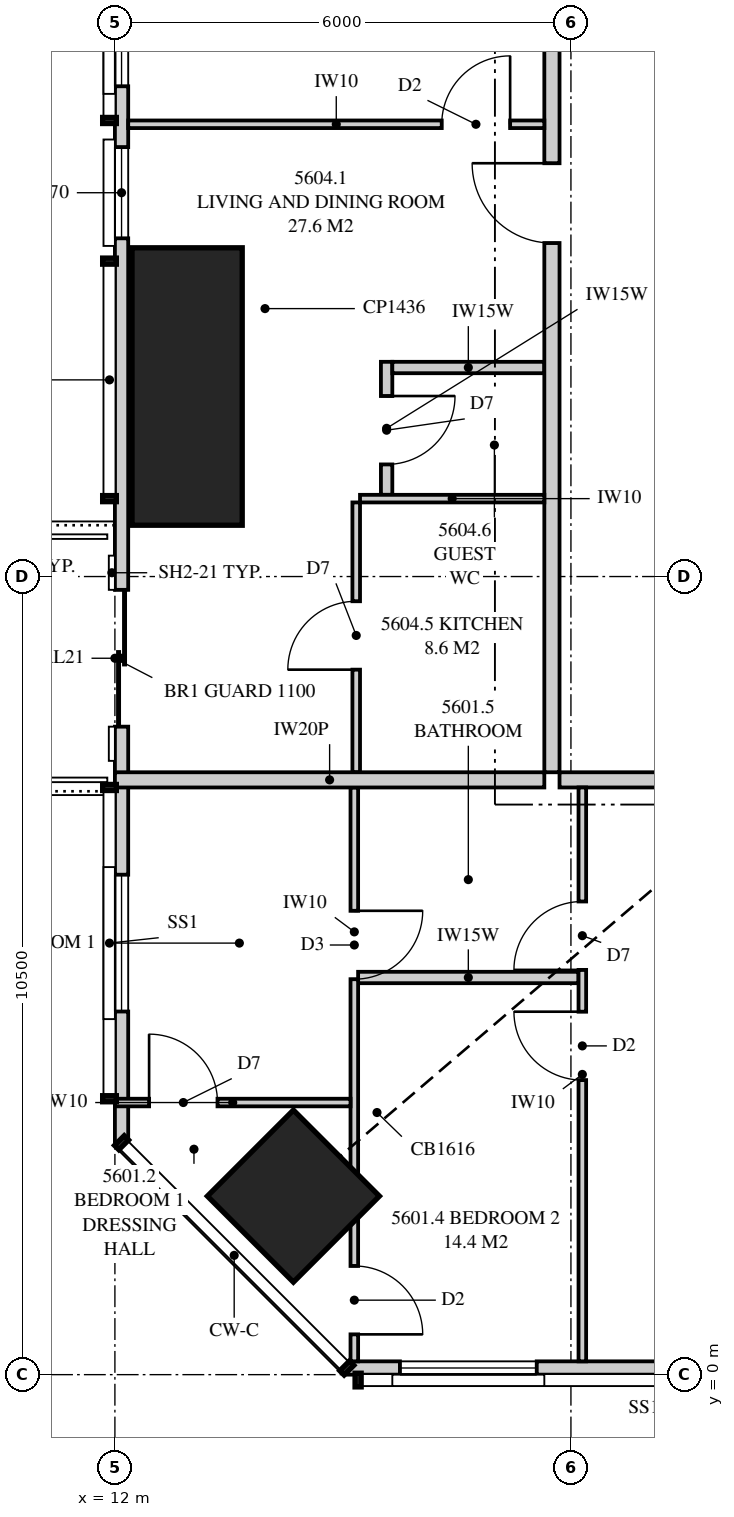
"""IFC4 building model, lengths in metres.
Left out: names, types, materials, properties, quantities, classifications, styles, units other than length and angle.
Written with IfcOpenShell. Run it as: python <this file> out.ifc"""

import sys

from ifc_helpers import new_model, si_unit, direction, frame, frame_2d, origin, origin_2d, place, context, subcontext, project, spatial, polyline, rectangle, hollow_rectangle, outline, extrude, element, fill, save


model = new_model("IFC4")
c1 = context("Model", 3, precision=1e-05, world=origin(), true_north=direction((0.0, 1.0)))
c2 = subcontext(c1, "Body", "Model", "MODEL_VIEW")
j1 = project(units=[si_unit("LENGTHUNIT", "METRE"), si_unit("PLANEANGLEUNIT", "RADIAN")], contexts=[c1])
p1 = place(None, origin())
s1 = spatial("IfcSite", under=j1, at=p1, CompositionType="ELEMENT")
p2 = place(p1, origin())
s2 = spatial("IfcBuilding", under=s1, at=p2, CompositionType="ELEMENT")
p3 = place(p2, frame((0.0, 0.0, 204.6)))
s3 = spatial("IfcBuildingStorey", under=s2, at=p3, CompositionType="ELEMENT", Elevation=204.6)
p4 = place(p3, frame((14.348, 2.348, 0.0), z_axis=(0.0, 0.0, 1.0), x_axis=(0.707106781187, 0.707106781187, 0.0)))
e1 = element("IfcColumn", 1, at=p4, inside=s3, PredefinedType="COLUMN", context=c2, shape_type="SweptSolid", body=[
    extrude(hollow_rectangle(XDim=1.6, YDim=1.6, WallThickness=0.125, at=origin_2d()), origin(), (0.0, 0.0, 1.0), 3.35),
])
p5 = place(p3, frame((12.95, 13.0, 0.0), z_axis=(0.0, 0.0, 1.0), x_axis=(1.0, 0.0, 0.0)))
e2 = element("IfcColumn", 2, at=p5, inside=s3, PredefinedType="COLUMN", context=c2, shape_type="SweptSolid", body=[
    extrude(rectangle(XDim=1.45, YDim=3.65, at=origin_2d()), origin(), (0.0, 0.0, 1.0), 3.35),
])
p6 = place(p3, frame((15.051, 0.087, 0.0), z_axis=(0.0, 0.0, 1.0), x_axis=(1.0, 0.0, 0.0)))
e3 = element("IfcWall", 3, at=p6, inside=s3, PredefinedType="SOLIDWALL", context=c2, shape_type="SweptSolid", body=[
    extrude(rectangle(XDim=34.897, YDim=0.175, at=frame_2d((17.449, 0.0))), origin(), (0.0, 0.0, 1.0), 3.07),
])
p7 = place(p6, frame((0.699, 0.0, 0.4)))
e4 = element("IfcOpeningElement", 4, at=p7, cuts=e3, PredefinedType="OPENING", context=c2, shape_type="SweptSolid", body=[
    extrude(rectangle(XDim=1.8, YDim=1.7, at=frame_2d((0.9, 0.85))), frame((0.0, 0.097, 0.0), z_axis=(0.0, -1.0, 0.0), x_axis=(1.0, 0.0, 0.0)), (0.0, 0.0, 1.0), 0.195),
])
p8 = place(p6, frame((9.274, 0.0, 0.4)))
e5 = element("IfcOpeningElement", 5, at=p8, cuts=e3, PredefinedType="OPENING", context=c2, shape_type="SweptSolid", body=[
    extrude(rectangle(XDim=2.4, YDim=1.7, at=frame_2d((1.2, 0.85))), frame((0.0, 0.097, 0.0), z_axis=(0.0, -1.0, 0.0), x_axis=(1.0, 0.0, 0.0)), (0.0, 0.0, 1.0), 0.195),
])
p9 = place(p6, frame((13.561, 0.0, 0.0)))
e6 = element("IfcOpeningElement", 6, at=p9, cuts=e3, PredefinedType="OPENING", context=c2, shape_type="SweptSolid", body=[
    extrude(rectangle(XDim=1.8, YDim=2.1, at=frame_2d((0.9, 1.05))), frame((0.0, 0.097, 0.0), z_axis=(0.0, -1.0, 0.0), x_axis=(1.0, 0.0, 0.0)), (0.0, 0.0, 1.0), 0.195),
])
p10 = place(p6, frame((20.049, 0.0, 0.4)))
e7 = element("IfcOpeningElement", 7, at=p10, cuts=e3, PredefinedType="OPENING", context=c2, shape_type="SweptSolid", body=[
    extrude(rectangle(XDim=1.8, YDim=1.7, at=frame_2d((0.9, 0.85))), frame((0.0, 0.097, 0.0), z_axis=(0.0, -1.0, 0.0), x_axis=(1.0, 0.0, 0.0)), (0.0, 0.0, 1.0), 0.195),
])
p11 = place(p6, frame((23.649, 0.0, 0.4)))
e8 = element("IfcOpeningElement", 8, at=p11, cuts=e3, PredefinedType="OPENING", context=c2, shape_type="SweptSolid", body=[
    extrude(rectangle(XDim=1.8, YDim=1.7, at=frame_2d((0.9, 0.85))), frame((0.0, 0.097, 0.0), z_axis=(0.0, -1.0, 0.0), x_axis=(1.0, 0.0, 0.0)), (0.0, 0.0, 1.0), 0.195),
])
p12 = place(p6, frame((29.625, 0.0, 0.4)))
e9 = element("IfcOpeningElement", 9, at=p12, cuts=e3, PredefinedType="OPENING", context=c2, shape_type="SweptSolid", body=[
    extrude(rectangle(XDim=1.8, YDim=1.7, at=frame_2d((0.9, 0.85))), frame((0.0, 0.097, 0.0), z_axis=(0.0, -1.0, 0.0), x_axis=(1.0, 0.0, 0.0)), (0.0, 0.0, 1.0), 0.195),
])
p13 = place(p6, frame((32.51, 0.0, 0.4)))
e10 = element("IfcOpeningElement", 10, at=p13, cuts=e3, PredefinedType="OPENING", context=c2, shape_type="SweptSolid", body=[
    extrude(rectangle(XDim=1.8, YDim=1.7, at=frame_2d((0.9, 0.85))), frame((0.0, 0.097, 0.0), z_axis=(0.0, -1.0, 0.0), x_axis=(1.0, 0.0, 0.0)), (0.0, 0.0, 1.0), 0.195),
])
p14 = place(p3, frame((12.087, 32.949, 0.0), z_axis=(0.0, 0.0, 1.0), x_axis=(0.0, -1.0, 0.0)))
e11 = element("IfcWall", 11, at=p14, inside=s3, PredefinedType="SOLIDWALL", context=c2, shape_type="SweptSolid", body=[
    extrude(rectangle(XDim=29.897, YDim=0.175, at=frame_2d((14.949, 0.0))), origin(), (0.0, 0.0, 1.0), 3.07),
])
p15 = place(p14, frame((1.226, 0.0, 0.4)))
e12 = element("IfcOpeningElement", 12, at=p15, cuts=e11, PredefinedType="OPENING", context=c2, shape_type="SweptSolid", body=[
    extrude(rectangle(XDim=1.8, YDim=1.7, at=frame_2d((0.9, 0.85))), frame((0.0, 0.097, 0.0), z_axis=(0.0, -1.0, 0.0), x_axis=(1.0, 0.0, 0.0)), (0.0, 0.0, 1.0), 0.195),
])
p16 = place(p14, frame((4.224, 0.0, 0.4)))
e13 = element("IfcOpeningElement", 13, at=p16, cuts=e11, PredefinedType="OPENING", context=c2, shape_type="SweptSolid", body=[
    extrude(rectangle(XDim=1.8, YDim=1.7, at=frame_2d((0.9, 0.85))), frame((0.0, 0.097, 0.0), z_axis=(0.0, -1.0, 0.0), x_axis=(1.0, 0.0, 0.0)), (0.0, 0.0, 1.0), 0.195),
])
p17 = place(p14, frame((10.974, 0.0, 0.4)))
e14 = element("IfcOpeningElement", 14, at=p17, cuts=e11, PredefinedType="OPENING", context=c2, shape_type="SweptSolid", body=[
    extrude(rectangle(XDim=1.8, YDim=1.7, at=frame_2d((0.9, 0.85))), frame((0.0, 0.097, 0.0), z_axis=(0.0, -1.0, 0.0), x_axis=(1.0, 0.0, 0.0)), (0.0, 0.0, 1.0), 0.195),
])
p18 = place(p14, frame((14.199, 0.0, 0.4)))
e15 = element("IfcOpeningElement", 15, at=p18, cuts=e11, PredefinedType="OPENING", context=c2, shape_type="SweptSolid", body=[
    extrude(rectangle(XDim=1.8, YDim=1.7, at=frame_2d((0.9, 0.85))), frame((0.0, 0.097, 0.0), z_axis=(0.0, -1.0, 0.0), x_axis=(1.0, 0.0, 0.0)), (0.0, 0.0, 1.0), 0.195),
])
p19 = place(p14, frame((22.624, 0.0, 0.0)))
e16 = element("IfcOpeningElement", 16, at=p19, cuts=e11, PredefinedType="OPENING", context=c2, shape_type="SweptSolid", body=[
    extrude(rectangle(XDim=1.8, YDim=2.1, at=frame_2d((0.9, 1.05))), frame((0.0, 0.097, 0.0), z_axis=(0.0, -1.0, 0.0), x_axis=(1.0, 0.0, 0.0)), (0.0, 0.0, 1.0), 0.195),
])
p20 = place(p14, frame((16.799, 0.0, 0.4)))
e17 = element("IfcOpeningElement", 17, at=p20, cuts=e11, PredefinedType="OPENING", context=c2, shape_type="SweptSolid", body=[
    extrude(rectangle(XDim=1.2, YDim=1.7, at=frame_2d((0.6, 0.85))), frame((0.0, 0.097, 0.0), z_axis=(0.0, -1.0, 0.0), x_axis=(1.0, 0.0, 0.0)), (0.0, 0.0, 1.0), 0.195),
])
p21 = place(p14, frame((26.371, 0.0, 0.4)))
e18 = element("IfcOpeningElement", 18, at=p21, cuts=e11, PredefinedType="OPENING", context=c2, shape_type="SweptSolid", body=[
    extrude(rectangle(XDim=1.8, YDim=1.7, at=frame_2d((0.9, 0.85))), frame((0.0, 0.097, 0.0), z_axis=(0.0, -1.0, 0.0), x_axis=(1.0, 0.0, 0.0)), (0.0, 0.0, 1.0), 0.195),
])
p22 = place(p3, frame((17.85, 7.825, 0.0), z_axis=(0.0, 0.0, 1.0), x_axis=(1.0, 0.0, 0.0)))
e19 = element("IfcWall", 19, at=p22, inside=s3, PredefinedType="PARTITIONING", context=c2, shape_type="SweptSolid", body=[
    extrude(outline(polyline([(0.0, 0.0), (3.85, 0.0), (3.85, 2.47), (3.69, 2.47), (3.69, 3.07), (3.392, 3.07), (3.392, 2.491), (2.43, 2.491), (2.43, 3.07), (0.0, 3.07), (0.0, 0.0)])), frame((0.0, 0.1, 0.0), z_axis=(0.0, -1.0, 0.0), x_axis=(1.0, 0.0, 0.0)), (0.0, 0.0, 1.0), 0.2),
])
p23 = place(p3, frame((15.15, 0.175, 0.0), z_axis=(0.0, 0.0, 1.0), x_axis=(0.0, 1.0, 0.0)))
e20 = element("IfcWall", 20, at=p23, inside=s3, PredefinedType="PARTITIONING", context=c2, shape_type="SweptSolid", body=[
    extrude(outline(polyline([(0.0, 0.0), (7.55, 0.0), (7.55, 3.07), (3.211, 3.07), (3.211, 2.491), (2.548, 2.491), (2.548, 2.07), (1.515, 2.07), (1.515, 3.07), (0.0, 3.07), (0.0, 0.0)])), frame((0.0, 0.05, 0.0), z_axis=(0.0, -1.0, 0.0), x_axis=(1.0, 0.0, 0.0)), (0.0, 0.0, 1.0), 0.1),
])
p24 = place(p23, frame((0.355, 0.0, 0.0)))
e21 = element("IfcOpeningElement", 21, at=p24, cuts=e20, PredefinedType="OPENING", context=c2, shape_type="SweptSolid", body=[
    extrude(rectangle(XDim=0.9, YDim=2.1, at=frame_2d((0.45, 1.05))), frame((0.0, 0.06, 0.0), z_axis=(0.0, -1.0, 0.0), x_axis=(1.0, 0.0, 0.0)), (0.0, 0.0, 1.0), 0.12),
])
p25 = place(p23, frame((5.027, 0.0, 0.0)))
e22 = element("IfcOpeningElement", 22, at=p25, cuts=e20, PredefinedType="OPENING", context=c2, shape_type="SweptSolid", body=[
    extrude(rectangle(XDim=0.9, YDim=2.1, at=frame_2d((0.45, 1.05))), frame((0.0, 0.06, 0.0), z_axis=(0.0, -1.0, 0.0), x_axis=(1.0, 0.0, 0.0)), (0.0, 0.0, 1.0), 0.12),
])
p26 = place(p3, frame((18.15, 0.175, 0.0), z_axis=(0.0, 0.0, 1.0), x_axis=(0.0, 1.0, 0.0)))
e23 = element("IfcWall", 23, at=p26, inside=s3, PredefinedType="PARTITIONING", context=c2, shape_type="SweptSolid", body=[
    extrude(outline(polyline([(0.0, 0.0), (7.55, 0.0), (7.55, 3.07), (5.774, 3.07), (5.774, 2.491), (5.067, 2.491), (5.067, 3.07), (2.017, 3.07), (2.017, 2.07), (0.984, 2.07), (0.984, 3.07), (0.0, 3.07), (0.0, 0.0)])), frame((0.0, 0.05, 0.0), z_axis=(0.0, -1.0, 0.0), x_axis=(1.0, 0.0, 0.0)), (0.0, 0.0, 1.0), 0.1),
])
p27 = place(p26, frame((3.7, 0.0, 0.0)))
e24 = element("IfcOpeningElement", 24, at=p27, cuts=e23, PredefinedType="OPENING", context=c2, shape_type="SweptSolid", body=[
    extrude(rectangle(XDim=0.9, YDim=2.1, at=frame_2d((0.45, 1.05))), frame((0.0, 0.06, 0.0), z_axis=(0.0, -1.0, 0.0), x_axis=(1.0, 0.0, 0.0)), (0.0, 0.0, 1.0), 0.12),
])
p28 = place(p26, frame((5.15, 0.0, 0.0)))
e25 = element("IfcOpeningElement", 25, at=p28, cuts=e23, PredefinedType="OPENING", context=c2, shape_type="SweptSolid", body=[
    extrude(rectangle(XDim=0.9, YDim=2.1, at=frame_2d((0.45, 1.05))), frame((0.0, 0.06, 0.0), z_axis=(0.0, -1.0, 0.0), x_axis=(1.0, 0.0, 0.0)), (0.0, 0.0, 1.0), 0.12),
])
p29 = place(p3, frame((12.0, 3.58, 0.0), z_axis=(0.0, 0.0, 1.0), x_axis=(1.0, 0.0, 0.0)))
e26 = element("IfcWall", 26, at=p29, inside=s3, PredefinedType="PARTITIONING", context=c2, shape_type="SweptSolid", body=[
    extrude(outline(polyline([(0.0, 0.0), (3.1, 0.0), (3.1, 3.07), (2.931, 3.07), (2.931, 2.694), (2.92, 2.638), (2.698, 2.628), (2.698, 2.07), (1.676, 2.07), (1.676, 3.07), (0.0, 3.07), (0.0, 0.0)])), frame((0.0, 0.05, 0.0), z_axis=(0.0, -1.0, 0.0), x_axis=(1.0, 0.0, 0.0)), (0.0, 0.0, 1.0), 0.1),
])
p30 = place(p29, frame((0.45, 0.0, 0.0)))
e27 = element("IfcOpeningElement", 27, at=p30, cuts=e26, PredefinedType="OPENING", context=c2, shape_type="SweptSolid", body=[
    extrude(rectangle(XDim=0.9, YDim=2.1, at=frame_2d((0.45, 1.05))), frame((0.0, 0.06, 0.0), z_axis=(0.0, -1.0, 0.0), x_axis=(1.0, 0.0, 0.0)), (0.0, 0.0, 1.0), 0.12),
])
p31 = place(p3, frame((15.2, 5.225, 0.0), z_axis=(0.0, 0.0, 1.0), x_axis=(1.0, 0.0, 0.0)))
e28 = element("IfcWall", 28, at=p31, inside=s3, PredefinedType="PLUMBINGWALL", context=c2, shape_type="SweptSolid", body=[
    extrude(outline(polyline([(0.0, 0.0), (2.9, 0.0), (2.9, 2.491), (2.065, 2.491), (2.065, 3.07), (0.0, 3.07), (0.0, 0.0)])), frame((0.0, 0.075, 0.0), z_axis=(0.0, -1.0, 0.0), x_axis=(1.0, 0.0, 0.0)), (0.0, 0.0, 1.0), 0.15),
])
p32 = place(p3, frame((12.0, 7.825, 0.0), z_axis=(0.0, 0.0, 1.0), x_axis=(1.0, 0.0, 0.0)))
e29 = element("IfcWall", 29, at=p32, inside=s3, PredefinedType="PARTITIONING", context=c2, shape_type="SweptSolid", body=[
    extrude(outline(polyline([(0.0, 0.0), (5.65, 0.0), (5.65, 3.07), (2.147, 3.07), (2.147, 2.07), (1.112, 2.07), (1.112, 3.07), (0.0, 3.07), (0.0, 0.0)])), frame((0.0, 0.1, 0.0), z_axis=(0.0, -1.0, 0.0), x_axis=(1.0, 0.0, 0.0)), (0.0, 0.0, 1.0), 0.2),
])
p33 = place(p3, frame((17.75, 7.925, 0.0), z_axis=(0.0, 0.0, 1.0), x_axis=(0.0, 1.0, 0.0)))
e30 = element("IfcWall", 30, at=p33, inside=s3, PredefinedType="PARTITIONING", context=c2, shape_type="SweptSolid", body=[
    extrude(outline(polyline([(0.0, 0.0), (14.925, 0.0), (14.925, 3.07), (5.287, 3.07), (5.287, 2.595), (4.863, 2.595), (4.863, 3.07), (0.0, 3.07), (0.0, 0.0)])), frame((0.0, 0.1, 0.0), z_axis=(0.0, -1.0, 0.0), x_axis=(1.0, 0.0, 0.0)), (0.0, 0.0, 1.0), 0.2),
])
p34 = place(p33, frame((6.962, 0.0, 0.0)))
e31 = element("IfcOpeningElement", 31, at=p34, cuts=e30, PredefinedType="OPENING", context=c2, shape_type="SweptSolid", body=[
    extrude(rectangle(XDim=1.05, YDim=2.2, at=frame_2d((0.525, 1.1))), frame((0.0, 0.11, 0.0), z_axis=(0.0, -1.0, 0.0), x_axis=(1.0, 0.0, 0.0)), (0.0, 0.0, 1.0), 0.22),
])
p35 = place(p3, frame((12.175, 16.45, 0.0), z_axis=(0.0, 0.0, 1.0), x_axis=(1.0, 0.0, 0.0)))
e32 = element("IfcWall", 32, at=p35, inside=s3, PredefinedType="PARTITIONING", context=c2, shape_type="SweptSolid", body=[
    extrude(outline(polyline([(0.0, 0.0), (5.475, 0.0), (5.475, 3.07), (1.275, 3.07), (1.275, 2.07), (0.275, 2.07), (0.275, 3.07), (0.0, 3.07), (0.0, 0.0)])), frame((0.0, 0.05, 0.0), z_axis=(0.0, -1.0, 0.0), x_axis=(1.0, 0.0, 0.0)), (0.0, 0.0, 1.0), 0.1),
])
p36 = place(p35, frame((4.125, 0.0, 0.0)))
e33 = element("IfcOpeningElement", 33, at=p36, cuts=e32, PredefinedType="OPENING", context=c2, shape_type="SweptSolid", body=[
    extrude(rectangle(XDim=0.9, YDim=2.1, at=frame_2d((0.45, 1.05))), frame((0.0, 0.06, 0.0), z_axis=(0.0, -1.0, 0.0), x_axis=(1.0, 0.0, 0.0)), (0.0, 0.0, 1.0), 0.12),
])
p37 = place(p3, frame((15.175, 7.925, 0.0), z_axis=(0.0, 0.0, 1.0), x_axis=(0.0, 1.0, 0.0)))
e34 = element("IfcWall", 34, at=p37, inside=s3, PredefinedType="PARTITIONING", context=c2, shape_type="SweptSolid", body=[
    extrude(rectangle(XDim=3.55, YDim=0.1, at=frame_2d((1.775, 0.0))), origin(), (0.0, 0.0, 1.0), 3.07),
])
p38 = place(p37, frame((1.35, 0.0, 0.0)))
e35 = element("IfcOpeningElement", 35, at=p38, cuts=e34, PredefinedType="OPENING", context=c2, shape_type="SweptSolid", body=[
    extrude(rectangle(XDim=0.9, YDim=2.1, at=frame_2d((0.45, 1.05))), frame((0.0, 0.06, 0.0), z_axis=(0.0, -1.0, 0.0), x_axis=(1.0, 0.0, 0.0)), (0.0, 0.0, 1.0), 0.12),
])
p39 = place(p3, frame((15.225, 11.525, 0.0), z_axis=(0.0, 0.0, 1.0), x_axis=(1.0, 0.0, 0.0)))
e36 = element("IfcWall", 36, at=p39, inside=s3, PredefinedType="PARTITIONING", context=c2, shape_type="SweptSolid", body=[
    extrude(rectangle(XDim=2.425, YDim=0.1, at=frame_2d((1.212, 0.0))), origin(), (0.0, 0.0, 1.0), 3.07),
])
p40 = place(p3, frame((15.575, 11.575, 0.0), z_axis=(0.0, 0.0, 1.0), x_axis=(0.0, 1.0, 0.0)))
e37 = element("IfcWall", 37, at=p40, inside=s3, PredefinedType="PLUMBINGWALL", context=c2, shape_type="SweptSolid", body=[
    extrude(outline(polyline([(0.0, 0.0), (1.75, 0.0), (1.75, 3.07), (1.637, 3.07), (1.637, 2.595), (1.213, 2.595), (1.213, 3.07), (0.0, 3.07), (0.0, 0.0)])), frame((0.0, 0.075, 0.0), z_axis=(0.0, -1.0, 0.0), x_axis=(1.0, 0.0, 0.0)), (0.0, 0.0, 1.0), 0.15),
])
p41 = place(p40, frame((0.4, 0.0, 0.0)))
e38 = element("IfcOpeningElement", 38, at=p41, cuts=e37, PredefinedType="OPENING", context=c2, shape_type="SweptSolid", body=[
    extrude(rectangle(XDim=0.9, YDim=2.1, at=frame_2d((0.45, 1.05))), frame((0.0, 0.085, 0.0), z_axis=(0.0, -1.0, 0.0), x_axis=(1.0, 0.0, 0.0)), (0.0, 0.0, 1.0), 0.17),
])
p42 = place(p3, frame((17.65, 13.25, 0.0), z_axis=(0.0, 0.0, 1.0), x_axis=(-1.0, 0.0, 0.0)))
e39 = element("IfcWall", 39, at=p42, inside=s3, PredefinedType="PLUMBINGWALL", context=c2, shape_type="SweptSolid", body=[
    extrude(rectangle(XDim=2.0, YDim=0.15, at=frame_2d((1.0, 0.0))), origin(), (0.0, 0.0, 1.0), 2.595),
])
p43 = place(p7, origin())
e40 = element("IfcWindow", 40, at=p43, inside=s3, PartitioningType="SINGLE_PANEL", PredefinedType="WINDOW", context=c2, shape_type="SweptSolid", body=[
    extrude(rectangle(XDim=1.8, YDim=1.7, at=frame_2d((0.9, 0.85))), frame((0.0, 0.03, 0.0), z_axis=(0.0, -1.0, 0.0), x_axis=(1.0, 0.0, 0.0)), (0.0, 0.0, 1.0), 0.06),
])
fill(e4, e40)
p44 = place(p18, origin())
e41 = element("IfcWindow", 41, at=p44, inside=s3, PartitioningType="SINGLE_PANEL", PredefinedType="WINDOW", context=c2, shape_type="SweptSolid", body=[
    extrude(rectangle(XDim=1.8, YDim=1.7, at=frame_2d((0.9, 0.85))), frame((0.0, 0.03, 0.0), z_axis=(0.0, -1.0, 0.0), x_axis=(1.0, 0.0, 0.0)), (0.0, 0.0, 1.0), 0.06),
])
fill(e15, e41)
p45 = place(p19, origin())
e42 = element("IfcDoor", 42, at=p45, inside=s3, OperationType="SLIDING_TO_LEFT", PredefinedType="DOOR", context=c2, shape_type="SweptSolid", body=[
    extrude(rectangle(XDim=1.8, YDim=2.1, at=frame_2d((0.9, 1.05))), frame((0.0, 0.025, 0.0), z_axis=(0.0, -1.0, 0.0), x_axis=(1.0, 0.0, 0.0)), (0.0, 0.0, 1.0), 0.05),
])
fill(e16, e42)
p46 = place(p20, origin())
e43 = element("IfcWindow", 43, at=p46, inside=s3, PartitioningType="SINGLE_PANEL", PredefinedType="WINDOW", context=c2, shape_type="SweptSolid", body=[
    extrude(rectangle(XDim=1.2, YDim=1.7, at=frame_2d((0.6, 0.85))), frame((0.0, 0.03, 0.0), z_axis=(0.0, -1.0, 0.0), x_axis=(1.0, 0.0, 0.0)), (0.0, 0.0, 1.0), 0.06),
])
fill(e17, e43)
p47 = place(p21, origin())
e44 = element("IfcWindow", 44, at=p47, inside=s3, PartitioningType="SINGLE_PANEL", PredefinedType="WINDOW", context=c2, shape_type="SweptSolid", body=[
    extrude(rectangle(XDim=1.8, YDim=1.7, at=frame_2d((0.9, 0.85))), frame((0.0, 0.03, 0.0), z_axis=(0.0, -1.0, 0.0), x_axis=(1.0, 0.0, 0.0)), (0.0, 0.0, 1.0), 0.06),
])
fill(e18, e44)
p48 = place(p30, origin())
e45 = element("IfcDoor", 45, at=p48, inside=s3, OperationType="SINGLE_SWING_LEFT", PredefinedType="DOOR", context=c2, shape_type="SweptSolid", body=[
    extrude(rectangle(XDim=0.9, YDim=2.1, at=frame_2d((0.45, 1.05))), frame((0.0, 0.025, 0.0), z_axis=(0.0, -1.0, 0.0), x_axis=(1.0, 0.0, 0.0)), (0.0, 0.0, 1.0), 0.05),
])
fill(e27, e45)
p49 = place(p24, frame((0.9, 0.0, 0.0), z_axis=(0.0, 0.0, 1.0), x_axis=(-1.0, 0.0, 0.0)))
e46 = element("IfcDoor", 46, at=p49, inside=s3, OperationType="SINGLE_SWING_RIGHT", PredefinedType="DOOR", context=c2, shape_type="SweptSolid", body=[
    extrude(rectangle(XDim=0.9, YDim=2.1, at=frame_2d((0.45, 1.05))), frame((0.0, 0.025, 0.0), z_axis=(0.0, -1.0, 0.0), x_axis=(1.0, 0.0, 0.0)), (0.0, 0.0, 1.0), 0.05),
])
fill(e21, e46)
p50 = place(p27, origin())
e47 = element("IfcDoor", 47, at=p50, inside=s3, OperationType="SINGLE_SWING_RIGHT", PredefinedType="DOOR", context=c2, shape_type="SweptSolid", body=[
    extrude(rectangle(XDim=0.9, YDim=2.1, at=frame_2d((0.45, 1.05))), frame((0.0, 0.025, 0.0), z_axis=(0.0, -1.0, 0.0), x_axis=(1.0, 0.0, 0.0)), (0.0, 0.0, 1.0), 0.05),
])
fill(e24, e47)
p51 = place(p28, origin())
e48 = element("IfcDoor", 48, at=p51, inside=s3, OperationType="SINGLE_SWING_LEFT", PredefinedType="DOOR", context=c2, shape_type="SweptSolid", body=[
    extrude(rectangle(XDim=0.9, YDim=2.1, at=frame_2d((0.45, 1.05))), frame((0.0, 0.025, 0.0), z_axis=(0.0, -1.0, 0.0), x_axis=(1.0, 0.0, 0.0)), (0.0, 0.0, 1.0), 0.05),
])
fill(e25, e48)
p52 = place(p25, frame((0.9, 0.0, 0.0), z_axis=(0.0, 0.0, 1.0), x_axis=(-1.0, 0.0, 0.0)))
e49 = element("IfcDoor", 49, at=p52, inside=s3, OperationType="SINGLE_SWING_LEFT", PredefinedType="DOOR", context=c2, shape_type="SweptSolid", body=[
    extrude(rectangle(XDim=0.9, YDim=2.1, at=frame_2d((0.45, 1.05))), frame((0.0, 0.025, 0.0), z_axis=(0.0, -1.0, 0.0), x_axis=(1.0, 0.0, 0.0)), (0.0, 0.0, 1.0), 0.05),
])
fill(e22, e49)
p53 = place(p34, origin())
e50 = element("IfcDoor", 50, at=p53, inside=s3, OperationType="SINGLE_SWING_RIGHT", PredefinedType="DOOR", context=c2, shape_type="SweptSolid", body=[
    extrude(rectangle(XDim=1.05, YDim=2.2, at=frame_2d((0.525, 1.1))), frame((0.0, 0.025, 0.0), z_axis=(0.0, -1.0, 0.0), x_axis=(1.0, 0.0, 0.0)), (0.0, 0.0, 1.0), 0.05),
])
fill(e31, e50)
p54 = place(p36, origin())
e51 = element("IfcDoor", 51, at=p54, inside=s3, OperationType="SINGLE_SWING_RIGHT", PredefinedType="DOOR", context=c2, shape_type="SweptSolid", body=[
    extrude(rectangle(XDim=0.9, YDim=2.1, at=frame_2d((0.45, 1.05))), frame((0.0, 0.025, 0.0), z_axis=(0.0, -1.0, 0.0), x_axis=(1.0, 0.0, 0.0)), (0.0, 0.0, 1.0), 0.05),
])
fill(e33, e51)
p55 = place(p38, origin())
e52 = element("IfcDoor", 52, at=p55, inside=s3, OperationType="SINGLE_SWING_LEFT", PredefinedType="DOOR", context=c2, shape_type="SweptSolid", body=[
    extrude(rectangle(XDim=0.9, YDim=2.1, at=frame_2d((0.45, 1.05))), frame((0.0, 0.025, 0.0), z_axis=(0.0, -1.0, 0.0), x_axis=(1.0, 0.0, 0.0)), (0.0, 0.0, 1.0), 0.05),
])
fill(e35, e52)
p56 = place(p41, frame((0.9, 0.0, 0.0), z_axis=(0.0, 0.0, 1.0), x_axis=(-1.0, 0.0, 0.0)))
e53 = element("IfcDoor", 53, at=p56, inside=s3, OperationType="SINGLE_SWING_LEFT", PredefinedType="DOOR", context=c2, shape_type="SweptSolid", body=[
    extrude(rectangle(XDim=0.9, YDim=2.1, at=frame_2d((0.45, 1.05))), frame((0.0, 0.025, 0.0), z_axis=(0.0, -1.0, 0.0), x_axis=(1.0, 0.0, 0.0)), (0.0, 0.0, 1.0), 0.05),
])
fill(e38, e53)
save(model, sys.argv[1])
